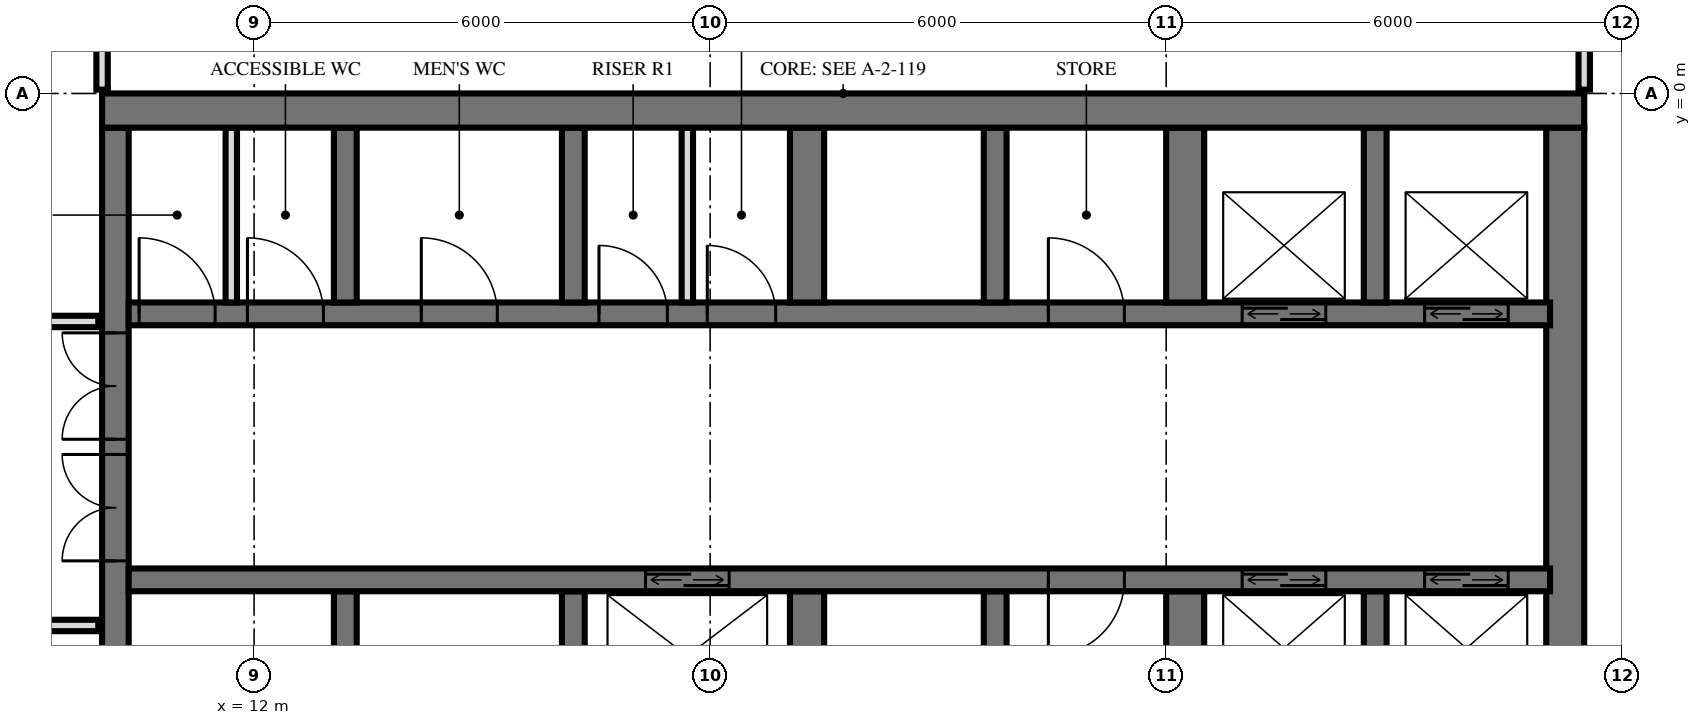
"""IFC4 building model, lengths in metres.
Left out: names, types, materials, properties, quantities, classifications, styles, units other than length and angle.
Written with IfcOpenShell. Run it as: python <this file> out.ifc"""

import sys

from ifc_helpers import new_model, si_unit, direction, frame, frame_2d, origin, place, context, subcontext, project, spatial, rectangle, extrude, element, fill, save


model = new_model("IFC4")
c1 = context("Model", 3, precision=1e-05, world=origin(), true_north=direction((0.0, 1.0)))
c2 = subcontext(c1, "Body", "Model", "MODEL_VIEW")
j1 = project(units=[si_unit("LENGTHUNIT", "METRE"), si_unit("PLANEANGLEUNIT", "RADIAN")], contexts=[c1])
p1 = place(None, origin())
s1 = spatial("IfcSite", under=j1, at=p1, CompositionType="ELEMENT")
p2 = place(p1, origin())
s2 = spatial("IfcBuilding", under=s1, at=p2, CompositionType="ELEMENT")
p3 = place(p2, frame((0.0, 0.0, 27.6)))
s3 = spatial("IfcBuildingStorey", under=s2, at=p3, CompositionType="ELEMENT", Elevation=27.6)
p4 = place(p3, frame((10.0, -0.225, 0.0), z_axis=(0.0, 0.0, 1.0), x_axis=(1.0, 0.0, 0.0)))
e1 = element("IfcWall", 1, at=p4, inside=s3, PredefinedType="SHEAR", context=c2, shape_type="SweptSolid", body=[
    extrude(rectangle(XDim=19.5, YDim=0.45, at=frame_2d((9.75, 0.0))), origin(), (0.0, 0.0, 1.0), 3.6),
])
p5 = place(p3, frame((10.175, -14.55, 0.0), z_axis=(0.0, 0.0, 1.0), x_axis=(0.0, 1.0, 0.0)))
e2 = element("IfcWall", 2, at=p5, inside=s3, PredefinedType="SHEAR", context=c2, shape_type="SweptSolid", body=[
    extrude(rectangle(XDim=14.1, YDim=0.35, at=frame_2d((7.05, 0.0))), origin(), (0.0, 0.0, 1.0), 3.6),
])
p6 = place(p5, frame((8.4, 0.0, 0.0)))
e3 = element("IfcOpeningElement", 3, at=p6, cuts=e2, PredefinedType="OPENING", context=c2, shape_type="SweptSolid", body=[
    extrude(rectangle(XDim=1.4, YDim=2.4, at=frame_2d((0.7, 1.2))), frame((0.0, 0.185, 0.0), z_axis=(0.0, -1.0, 0.0), x_axis=(1.0, 0.0, 0.0)), (0.0, 0.0, 1.0), 0.37),
])
p7 = place(p5, frame((10.0, 0.0, 0.0)))
e4 = element("IfcOpeningElement", 4, at=p7, cuts=e2, PredefinedType="OPENING", context=c2, shape_type="SweptSolid", body=[
    extrude(rectangle(XDim=1.4, YDim=2.4, at=frame_2d((0.7, 1.2))), frame((0.0, 0.185, 0.0), z_axis=(0.0, -1.0, 0.0), x_axis=(1.0, 0.0, 0.0)), (0.0, 0.0, 1.0), 0.37),
])
p8 = place(p5, frame((4.0, 0.0, 0.0)))
e5 = element("IfcOpeningElement", 5, at=p8, cuts=e2, PredefinedType="OPENING", context=c2, shape_type="SweptSolid", body=[
    extrude(rectangle(XDim=1.2, YDim=2.1, at=frame_2d((0.6, 1.05))), frame((0.0, 0.185, 0.0), z_axis=(0.0, -1.0, 0.0), x_axis=(1.0, 0.0, 0.0)), (0.0, 0.0, 1.0), 0.37),
])
p9 = place(p3, frame((29.25, -14.55, 0.0), z_axis=(0.0, 0.0, 1.0), x_axis=(0.0, 1.0, 0.0)))
e6 = element("IfcWall", 6, at=p9, inside=s3, PredefinedType="SHEAR", context=c2, shape_type="SweptSolid", body=[
    extrude(rectangle(XDim=14.1, YDim=0.5, at=frame_2d((7.05, 0.0))), origin(), (0.0, 0.0, 1.0), 3.6),
])
p10 = place(p3, frame((10.35, -2.9, 0.0), z_axis=(0.0, 0.0, 1.0), x_axis=(1.0, 0.0, 0.0)))
e7 = element("IfcWall", 7, at=p10, inside=s3, PredefinedType="SHEAR", context=c2, shape_type="SweptSolid", body=[
    extrude(rectangle(XDim=18.7, YDim=0.3, at=frame_2d((9.35, 0.0))), origin(), (0.0, 0.0, 1.0), 3.6),
])
p11 = place(p10, frame((14.65, 0.0, 0.0)))
e8 = element("IfcOpeningElement", 8, at=p11, cuts=e7, PredefinedType="OPENING", context=c2, shape_type="SweptSolid", body=[
    extrude(rectangle(XDim=1.1, YDim=2.1, at=frame_2d((0.55, 1.05))), frame((0.0, 0.16, 0.0), z_axis=(0.0, -1.0, 0.0), x_axis=(1.0, 0.0, 0.0)), (0.0, 0.0, 1.0), 0.32),
])
p12 = place(p10, frame((17.05, 0.0, 0.0)))
e9 = element("IfcOpeningElement", 9, at=p12, cuts=e7, PredefinedType="OPENING", context=c2, shape_type="SweptSolid", body=[
    extrude(rectangle(XDim=1.1, YDim=2.1, at=frame_2d((0.55, 1.05))), frame((0.0, 0.16, 0.0), z_axis=(0.0, -1.0, 0.0), x_axis=(1.0, 0.0, 0.0)), (0.0, 0.0, 1.0), 0.32),
])
p13 = place(p10, frame((6.188, 0.0, 0.0)))
e10 = element("IfcOpeningElement", 10, at=p13, cuts=e7, PredefinedType="OPENING", context=c2, shape_type="SweptSolid", body=[
    extrude(rectangle(XDim=0.9, YDim=2.1, at=frame_2d((0.45, 1.05))), frame((0.0, 0.16, 0.0), z_axis=(0.0, -1.0, 0.0), x_axis=(1.0, 0.0, 0.0)), (0.0, 0.0, 1.0), 0.32),
])
p14 = place(p10, frame((7.613, 0.0, 0.0)))
e11 = element("IfcOpeningElement", 11, at=p14, cuts=e7, PredefinedType="OPENING", context=c2, shape_type="SweptSolid", body=[
    extrude(rectangle(XDim=0.9, YDim=2.1, at=frame_2d((0.45, 1.05))), frame((0.0, 0.16, 0.0), z_axis=(0.0, -1.0, 0.0), x_axis=(1.0, 0.0, 0.0)), (0.0, 0.0, 1.0), 0.32),
])
p15 = place(p10, frame((0.137, 0.0, 0.0)))
e12 = element("IfcOpeningElement", 12, at=p15, cuts=e7, PredefinedType="OPENING", context=c2, shape_type="SweptSolid", body=[
    extrude(rectangle(XDim=1.0, YDim=2.1, at=frame_2d((0.5, 1.05))), frame((0.0, 0.16, 0.0), z_axis=(0.0, -1.0, 0.0), x_axis=(1.0, 0.0, 0.0)), (0.0, 0.0, 1.0), 0.32),
])
p16 = place(p10, frame((1.562, 0.0, 0.0)))
e13 = element("IfcOpeningElement", 13, at=p16, cuts=e7, PredefinedType="OPENING", context=c2, shape_type="SweptSolid", body=[
    extrude(rectangle(XDim=1.0, YDim=2.1, at=frame_2d((0.5, 1.05))), frame((0.0, 0.16, 0.0), z_axis=(0.0, -1.0, 0.0), x_axis=(1.0, 0.0, 0.0)), (0.0, 0.0, 1.0), 0.32),
])
p17 = place(p10, frame((3.85, 0.0, 0.0)))
e14 = element("IfcOpeningElement", 14, at=p17, cuts=e7, PredefinedType="OPENING", context=c2, shape_type="SweptSolid", body=[
    extrude(rectangle(XDim=1.0, YDim=2.1, at=frame_2d((0.5, 1.05))), frame((0.0, 0.16, 0.0), z_axis=(0.0, -1.0, 0.0), x_axis=(1.0, 0.0, 0.0)), (0.0, 0.0, 1.0), 0.32),
])
p18 = place(p10, frame((12.1, 0.0, 0.0)))
e15 = element("IfcOpeningElement", 15, at=p18, cuts=e7, PredefinedType="OPENING", context=c2, shape_type="SweptSolid", body=[
    extrude(rectangle(XDim=1.0, YDim=2.1, at=frame_2d((0.5, 1.05))), frame((0.0, 0.16, 0.0), z_axis=(0.0, -1.0, 0.0), x_axis=(1.0, 0.0, 0.0)), (0.0, 0.0, 1.0), 0.32),
])
p19 = place(p3, frame((10.35, -6.4, 0.0), z_axis=(0.0, 0.0, 1.0), x_axis=(1.0, 0.0, 0.0)))
e16 = element("IfcWall", 16, at=p19, inside=s3, PredefinedType="SHEAR", context=c2, shape_type="SweptSolid", body=[
    extrude(rectangle(XDim=18.7, YDim=0.3, at=frame_2d((9.35, 0.0))), origin(), (0.0, 0.0, 1.0), 3.6),
])
p20 = place(p19, frame((14.65, 0.0, 0.0)))
e17 = element("IfcOpeningElement", 17, at=p20, cuts=e16, PredefinedType="OPENING", context=c2, shape_type="SweptSolid", body=[
    extrude(rectangle(XDim=1.1, YDim=2.1, at=frame_2d((0.55, 1.05))), frame((0.0, 0.16, 0.0), z_axis=(0.0, -1.0, 0.0), x_axis=(1.0, 0.0, 0.0)), (0.0, 0.0, 1.0), 0.32),
])
p21 = place(p19, frame((17.05, 0.0, 0.0)))
e18 = element("IfcOpeningElement", 18, at=p21, cuts=e16, PredefinedType="OPENING", context=c2, shape_type="SweptSolid", body=[
    extrude(rectangle(XDim=1.1, YDim=2.1, at=frame_2d((0.55, 1.05))), frame((0.0, 0.16, 0.0), z_axis=(0.0, -1.0, 0.0), x_axis=(1.0, 0.0, 0.0)), (0.0, 0.0, 1.0), 0.32),
])
p22 = place(p19, frame((6.8, 0.0, 0.0)))
e19 = element("IfcOpeningElement", 19, at=p22, cuts=e16, PredefinedType="OPENING", context=c2, shape_type="SweptSolid", body=[
    extrude(rectangle(XDim=1.1, YDim=2.1, at=frame_2d((0.55, 1.05))), frame((0.0, 0.16, 0.0), z_axis=(0.0, -1.0, 0.0), x_axis=(1.0, 0.0, 0.0)), (0.0, 0.0, 1.0), 0.32),
])
p23 = place(p19, frame((12.1, 0.0, 0.0)))
e20 = element("IfcOpeningElement", 20, at=p23, cuts=e16, PredefinedType="OPENING", context=c2, shape_type="SweptSolid", body=[
    extrude(rectangle(XDim=1.0, YDim=2.1, at=frame_2d((0.5, 1.05))), frame((0.0, 0.16, 0.0), z_axis=(0.0, -1.0, 0.0), x_axis=(1.0, 0.0, 0.0)), (0.0, 0.0, 1.0), 0.32),
])
for number, where, z_axis, x_axis in (
    (21, (13.2, -2.75, 0.0), (0.0, 0.0, 1.0), (0.0, 1.0, 0.0)),
    (22, (13.2, -8.85, 0.0), (0.0, 0.0, 1.0), (0.0, 1.0, 0.0)),
    (23, (16.2, -2.75, 0.0), (0.0, 0.0, 1.0), (0.0, 1.0, 0.0)),
    (24, (16.2, -8.85, 0.0), (0.0, 0.0, 1.0), (0.0, 1.0, 0.0)),
):
    element("IfcWall", number, at=place(p3, frame(where, z_axis=z_axis, x_axis=x_axis)), inside=s3, PredefinedType="SHEAR", context=c2, shape_type="SweptSolid", body=[
        extrude(rectangle(XDim=2.3, YDim=0.3, at=frame_2d((1.15, 0.0))), origin(), (0.0, 0.0, 1.0), 3.6),
    ])
for number, where, z_axis, x_axis in (
    (25, (19.275, -2.75, 0.0), (0.0, 0.0, 1.0), (0.0, 1.0, 0.0)),
    (26, (19.275, -8.85, 0.0), (0.0, 0.0, 1.0), (0.0, 1.0, 0.0)),
):
    element("IfcWall", number, at=place(p3, frame(where, z_axis=z_axis, x_axis=x_axis)), inside=s3, PredefinedType="SHEAR", context=c2, shape_type="SweptSolid", body=[
        extrude(rectangle(XDim=2.3, YDim=0.45, at=frame_2d((1.15, 0.0))), origin(), (0.0, 0.0, 1.0), 3.6),
    ])
for number, where, z_axis, x_axis in (
    (27, (21.75, -2.75, 0.0), (0.0, 0.0, 1.0), (0.0, 1.0, 0.0)),
    (28, (21.75, -8.85, 0.0), (0.0, 0.0, 1.0), (0.0, 1.0, 0.0)),
):
    element("IfcWall", number, at=place(p3, frame(where, z_axis=z_axis, x_axis=x_axis)), inside=s3, PredefinedType="SHEAR", context=c2, shape_type="SweptSolid", body=[
        extrude(rectangle(XDim=2.3, YDim=0.3, at=frame_2d((1.15, 0.0))), origin(), (0.0, 0.0, 1.0), 3.6),
    ])
for number, where, z_axis, x_axis in (
    (29, (24.25, -2.75, 0.0), (0.0, 0.0, 1.0), (0.0, 1.0, 0.0)),
    (30, (24.25, -8.85, 0.0), (0.0, 0.0, 1.0), (0.0, 1.0, 0.0)),
):
    element("IfcWall", number, at=place(p3, frame(where, z_axis=z_axis, x_axis=x_axis)), inside=s3, PredefinedType="SHEAR", context=c2, shape_type="SweptSolid", body=[
        extrude(rectangle(XDim=2.3, YDim=0.5, at=frame_2d((1.15, 0.0))), origin(), (0.0, 0.0, 1.0), 3.6),
    ])
for number, where, z_axis, x_axis in (
    (31, (26.75, -2.75, 0.0), (0.0, 0.0, 1.0), (0.0, 1.0, 0.0)),
    (32, (26.75, -8.85, 0.0), (0.0, 0.0, 1.0), (0.0, 1.0, 0.0)),
):
    element("IfcWall", number, at=place(p3, frame(where, z_axis=z_axis, x_axis=x_axis)), inside=s3, PredefinedType="SHEAR", context=c2, shape_type="SweptSolid", body=[
        extrude(rectangle(XDim=2.3, YDim=0.3, at=frame_2d((1.15, 0.0))), origin(), (0.0, 0.0, 1.0), 3.6),
    ])
for number, where, z_axis, x_axis in (
    (33, (17.7, -2.75, 0.0), (0.0, 0.0, 1.0), (0.0, 1.0, 0.0)),
    (34, (11.7, -2.75, 0.0), (0.0, 0.0, 1.0), (0.0, 1.0, 0.0)),
):
    element("IfcWall", number, at=place(p3, frame(where, z_axis=z_axis, x_axis=x_axis)), inside=s3, PredefinedType="PARTITIONING", context=c2, shape_type="SweptSolid", body=[
        extrude(rectangle(XDim=2.3, YDim=0.15, at=frame_2d((1.15, 0.0))), origin(), (0.0, 0.0, 1.0), 3.3),
    ])
p24 = place(p3, frame((29.5, 0.05, 0.0), z_axis=(0.0, 0.0, 1.0), x_axis=(0.0, 1.0, 0.0)))
e35 = element("IfcWall", 35, at=p24, inside=s3, PredefinedType="PARTITIONING", context=c2, shape_type="SweptSolid", body=[
    extrude(rectangle(XDim=0.827, YDim=0.15, at=frame_2d((0.414, 0.0))), origin(), (0.0, 0.0, 1.0), 3.32),
])
p25 = place(p3, frame((10.0, 0.05, 0.0), z_axis=(0.0, 0.0, 1.0), x_axis=(0.0, 1.0, 0.0)))
e36 = element("IfcWall", 36, at=p25, inside=s3, PredefinedType="PARTITIONING", context=c2, shape_type="SweptSolid", body=[
    extrude(rectangle(XDim=0.97, YDim=0.15, at=frame_2d((0.485, 0.0))), origin(), (0.0, 0.0, 1.0), 3.32),
])
p26 = place(p3, frame((-9.95, -7.0, 0.0), z_axis=(0.0, 0.0, 1.0), x_axis=(1.0, 0.0, 0.0)))
e37 = element("IfcWall", 37, at=p26, inside=s3, PredefinedType="PARTITIONING", context=c2, shape_type="SweptSolid", body=[
    extrude(rectangle(XDim=19.9, YDim=0.15, at=frame_2d((9.95, 0.0))), origin(), (0.0, 0.0, 1.0), 3.32),
])
p27 = place(p26, frame((9.45, 0.0, 0.0)))
e38 = element("IfcOpeningElement", 38, at=p27, cuts=e37, PredefinedType="OPENING", context=c2, shape_type="SweptSolid", body=[
    extrude(rectangle(XDim=1.0, YDim=2.1, at=frame_2d((0.5, 1.05))), frame((0.0, 0.085, 0.0), z_axis=(0.0, -1.0, 0.0), x_axis=(1.0, 0.0, 0.0)), (0.0, 0.0, 1.0), 0.17),
])
p28 = place(p26, frame((3.45, 0.0, 0.0)))
e39 = element("IfcOpeningElement", 39, at=p28, cuts=e37, PredefinedType="OPENING", context=c2, shape_type="SweptSolid", body=[
    extrude(rectangle(XDim=1.0, YDim=2.1, at=frame_2d((0.5, 1.05))), frame((0.0, 0.085, 0.0), z_axis=(0.0, -1.0, 0.0), x_axis=(1.0, 0.0, 0.0)), (0.0, 0.0, 1.0), 0.17),
])
p29 = place(p3, frame((-9.95, -3.0, 0.0), z_axis=(0.0, 0.0, 1.0), x_axis=(1.0, 0.0, 0.0)))
e40 = element("IfcWall", 40, at=p29, inside=s3, PredefinedType="PARTITIONING", context=c2, shape_type="SweptSolid", body=[
    extrude(rectangle(XDim=19.9, YDim=0.15, at=frame_2d((9.95, 0.0))), origin(), (0.0, 0.0, 1.0), 3.32),
])
p30 = place(p29, frame((0.95, 0.0, 0.0)))
e41 = element("IfcOpeningElement", 41, at=p30, cuts=e40, PredefinedType="OPENING", context=c2, shape_type="SweptSolid", body=[
    extrude(rectangle(XDim=1.0, YDim=2.1, at=frame_2d((0.5, 1.05))), frame((0.0, 0.085, 0.0), z_axis=(0.0, -1.0, 0.0), x_axis=(1.0, 0.0, 0.0)), (0.0, 0.0, 1.0), 0.17),
])
p31 = place(p29, frame((3.7, 0.0, 0.0)))
e42 = element("IfcOpeningElement", 42, at=p31, cuts=e40, PredefinedType="OPENING", context=c2, shape_type="SweptSolid", body=[
    extrude(rectangle(XDim=1.0, YDim=2.1, at=frame_2d((0.5, 1.05))), frame((0.0, 0.085, 0.0), z_axis=(0.0, -1.0, 0.0), x_axis=(1.0, 0.0, 0.0)), (0.0, 0.0, 1.0), 0.17),
])
p32 = place(p29, frame((8.45, 0.0, 0.0)))
e43 = element("IfcOpeningElement", 43, at=p32, cuts=e40, PredefinedType="OPENING", context=c2, shape_type="SweptSolid", body=[
    extrude(rectangle(XDim=1.0, YDim=2.1, at=frame_2d((0.5, 1.05))), frame((0.0, 0.085, 0.0), z_axis=(0.0, -1.0, 0.0), x_axis=(1.0, 0.0, 0.0)), (0.0, 0.0, 1.0), 0.17),
])
p33 = place(p29, frame((15.7, 0.0, 0.0)))
e44 = element("IfcOpeningElement", 44, at=p33, cuts=e40, PredefinedType="OPENING", context=c2, shape_type="SweptSolid", body=[
    extrude(rectangle(XDim=1.0, YDim=2.1, at=frame_2d((0.5, 1.05))), frame((0.0, 0.085, 0.0), z_axis=(0.0, -1.0, 0.0), x_axis=(1.0, 0.0, 0.0)), (0.0, 0.0, 1.0), 0.17),
])
p34 = place(p11, origin())
e45 = element("IfcDoor", 45, at=p34, inside=s3, OperationType="DOUBLE_DOOR_SLIDING", PredefinedType="USERDEFINED", context=c2, shape_type="SweptSolid", body=[
    extrude(rectangle(XDim=1.1, YDim=2.1, at=frame_2d((0.55, 1.05))), frame((0.0, 0.025, 0.0), z_axis=(0.0, -1.0, 0.0), x_axis=(1.0, 0.0, 0.0)), (0.0, 0.0, 1.0), 0.05),
])
fill(e8, e45)
p35 = place(p12, origin())
e46 = element("IfcDoor", 46, at=p35, inside=s3, OperationType="DOUBLE_DOOR_SLIDING", PredefinedType="USERDEFINED", context=c2, shape_type="SweptSolid", body=[
    extrude(rectangle(XDim=1.1, YDim=2.1, at=frame_2d((0.55, 1.05))), frame((0.0, 0.025, 0.0), z_axis=(0.0, -1.0, 0.0), x_axis=(1.0, 0.0, 0.0)), (0.0, 0.0, 1.0), 0.05),
])
fill(e9, e46)
p36 = place(p20, origin())
e47 = element("IfcDoor", 47, at=p36, inside=s3, OperationType="DOUBLE_DOOR_SLIDING", PredefinedType="USERDEFINED", context=c2, shape_type="SweptSolid", body=[
    extrude(rectangle(XDim=1.1, YDim=2.1, at=frame_2d((0.55, 1.05))), frame((0.0, 0.025, 0.0), z_axis=(0.0, -1.0, 0.0), x_axis=(1.0, 0.0, 0.0)), (0.0, 0.0, 1.0), 0.05),
])
fill(e17, e47)
p37 = place(p21, origin())
e48 = element("IfcDoor", 48, at=p37, inside=s3, OperationType="DOUBLE_DOOR_SLIDING", PredefinedType="USERDEFINED", context=c2, shape_type="SweptSolid", body=[
    extrude(rectangle(XDim=1.1, YDim=2.1, at=frame_2d((0.55, 1.05))), frame((0.0, 0.025, 0.0), z_axis=(0.0, -1.0, 0.0), x_axis=(1.0, 0.0, 0.0)), (0.0, 0.0, 1.0), 0.05),
])
fill(e18, e48)
p38 = place(p22, origin())
e49 = element("IfcDoor", 49, at=p38, inside=s3, OperationType="DOUBLE_DOOR_SLIDING", PredefinedType="USERDEFINED", context=c2, shape_type="SweptSolid", body=[
    extrude(rectangle(XDim=1.1, YDim=2.1, at=frame_2d((0.55, 1.05))), frame((0.0, 0.025, 0.0), z_axis=(0.0, -1.0, 0.0), x_axis=(1.0, 0.0, 0.0)), (0.0, 0.0, 1.0), 0.05),
])
fill(e19, e49)
p39 = place(p6, origin())
e50 = element("IfcDoor", 50, at=p39, inside=s3, OperationType="DOUBLE_DOOR_SINGLE_SWING", PredefinedType="DOOR", context=c2, shape_type="SweptSolid", body=[
    extrude(rectangle(XDim=1.4, YDim=2.4, at=frame_2d((0.7, 1.2))), frame((0.0, 0.025, 0.0), z_axis=(0.0, -1.0, 0.0), x_axis=(1.0, 0.0, 0.0)), (0.0, 0.0, 1.0), 0.05),
])
fill(e3, e50)
p40 = place(p7, origin())
e51 = element("IfcDoor", 51, at=p40, inside=s3, OperationType="DOUBLE_DOOR_SINGLE_SWING", PredefinedType="DOOR", context=c2, shape_type="SweptSolid", body=[
    extrude(rectangle(XDim=1.4, YDim=2.4, at=frame_2d((0.7, 1.2))), frame((0.0, 0.025, 0.0), z_axis=(0.0, -1.0, 0.0), x_axis=(1.0, 0.0, 0.0)), (0.0, 0.0, 1.0), 0.05),
])
fill(e4, e51)
p41 = place(p13, origin())
e52 = element("IfcDoor", 52, at=p41, inside=s3, OperationType="SINGLE_SWING_RIGHT", PredefinedType="DOOR", context=c2, shape_type="SweptSolid", body=[
    extrude(rectangle(XDim=0.9, YDim=2.1, at=frame_2d((0.45, 1.05))), frame((0.0, 0.025, 0.0), z_axis=(0.0, -1.0, 0.0), x_axis=(1.0, 0.0, 0.0)), (0.0, 0.0, 1.0), 0.05),
])
fill(e10, e52)
p42 = place(p14, origin())
e53 = element("IfcDoor", 53, at=p42, inside=s3, OperationType="SINGLE_SWING_RIGHT", PredefinedType="DOOR", context=c2, shape_type="SweptSolid", body=[
    extrude(rectangle(XDim=0.9, YDim=2.1, at=frame_2d((0.45, 1.05))), frame((0.0, 0.025, 0.0), z_axis=(0.0, -1.0, 0.0), x_axis=(1.0, 0.0, 0.0)), (0.0, 0.0, 1.0), 0.05),
])
fill(e11, e53)
p43 = place(p15, origin())
e54 = element("IfcDoor", 54, at=p43, inside=s3, OperationType="SINGLE_SWING_RIGHT", PredefinedType="DOOR", context=c2, shape_type="SweptSolid", body=[
    extrude(rectangle(XDim=1.0, YDim=2.1, at=frame_2d((0.5, 1.05))), frame((0.0, 0.025, 0.0), z_axis=(0.0, -1.0, 0.0), x_axis=(1.0, 0.0, 0.0)), (0.0, 0.0, 1.0), 0.05),
])
fill(e12, e54)
p44 = place(p16, origin())
e55 = element("IfcDoor", 55, at=p44, inside=s3, OperationType="SINGLE_SWING_RIGHT", PredefinedType="DOOR", context=c2, shape_type="SweptSolid", body=[
    extrude(rectangle(XDim=1.0, YDim=2.1, at=frame_2d((0.5, 1.05))), frame((0.0, 0.025, 0.0), z_axis=(0.0, -1.0, 0.0), x_axis=(1.0, 0.0, 0.0)), (0.0, 0.0, 1.0), 0.05),
])
fill(e13, e55)
p45 = place(p17, origin())
e56 = element("IfcDoor", 56, at=p45, inside=s3, OperationType="SINGLE_SWING_RIGHT", PredefinedType="DOOR", context=c2, shape_type="SweptSolid", body=[
    extrude(rectangle(XDim=1.0, YDim=2.1, at=frame_2d((0.5, 1.05))), frame((0.0, 0.025, 0.0), z_axis=(0.0, -1.0, 0.0), x_axis=(1.0, 0.0, 0.0)), (0.0, 0.0, 1.0), 0.05),
])
fill(e14, e56)
p46 = place(p18, origin())
e57 = element("IfcDoor", 57, at=p46, inside=s3, OperationType="SINGLE_SWING_RIGHT", PredefinedType="DOOR", context=c2, shape_type="SweptSolid", body=[
    extrude(rectangle(XDim=1.0, YDim=2.1, at=frame_2d((0.5, 1.05))), frame((0.0, 0.025, 0.0), z_axis=(0.0, -1.0, 0.0), x_axis=(1.0, 0.0, 0.0)), (0.0, 0.0, 1.0), 0.05),
])
fill(e15, e57)
p47 = place(p23, frame((0.5, 0.0, 0.0), z_axis=(0.0, 0.0, 1.0), x_axis=(-1.0, 0.0, 0.0)))
e58 = element("IfcDoor", 58, at=p47, inside=s3, OperationType="SINGLE_SWING_LEFT", PredefinedType="DOOR", context=c2, shape_type="SweptSolid", body=[
    extrude(rectangle(XDim=1.0, YDim=2.1, at=frame_2d((0.0, 1.05))), frame((0.0, -0.025, 0.0), z_axis=(0.0, 1.0, 0.0), x_axis=(-1.0, 0.0, 0.0)), (0.0, 0.0, 1.0), 0.05),
])
fill(e20, e58)
save(model, sys.argv[1])
